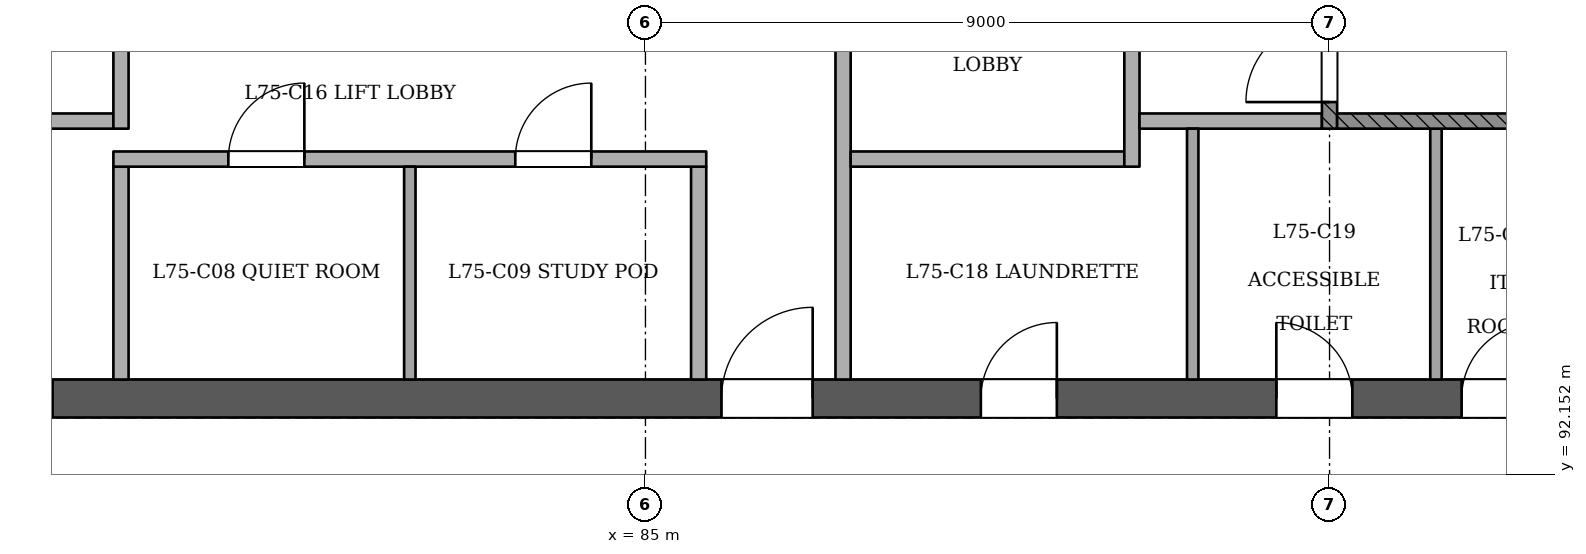
"""IFC4 building model, lengths in metres.
Left out: names, types, materials, properties, quantities, classifications, styles, units other than length and angle.
Written with IfcOpenShell. Run it as: python <this file> out.ifc"""

import sys

from ifc_helpers import new_model, si_unit, direction, frame, frame_2d, origin, place, context, subcontext, project, spatial, rectangle, extrude, element, fill, save


model = new_model("IFC4")
c1 = context("Model", 3, precision=1e-05, world=origin(), true_north=direction((0.0, 1.0)))
c2 = subcontext(c1, "Body", "Model", "MODEL_VIEW")
j1 = project(units=[si_unit("LENGTHUNIT", "METRE"), si_unit("PLANEANGLEUNIT", "RADIAN")], contexts=[c1])
p1 = place(None, origin())
s1 = spatial("IfcSite", under=j1, at=p1, CompositionType="ELEMENT")
p2 = place(p1, origin())
s2 = spatial("IfcBuilding", under=s1, at=p2, CompositionType="ELEMENT")
p3 = place(p2, frame((0.0, 0.0, 291.4)))
s3 = spatial("IfcBuildingStorey", under=s2, at=p3, CompositionType="ELEMENT", Elevation=291.4)
p4 = place(p3, frame((72.75, 93.15, 0.0), z_axis=(0.0, 0.0, 1.0), x_axis=(1.0, 0.0, 0.0)))
e1 = element("IfcWall", 1, at=p4, inside=s3, PredefinedType="SHEAR", context=c2, shape_type="SweptSolid", body=[
    extrude(rectangle(XDim=24.75, YDim=0.5, at=frame_2d((12.375, 0.0))), origin(), (0.0, 0.0, 1.0), 3.6),
])
p5 = place(p4, frame((1.05, 0.0, 0.0)))
e2 = element("IfcOpeningElement", 2, at=p5, cuts=e1, PredefinedType="OPENING", context=c2, shape_type="SweptSolid", body=[
    extrude(rectangle(XDim=1.2, YDim=2.1, at=frame_2d((0.6, 1.05))), frame((0.0, 0.26, 0.0), z_axis=(0.0, -1.0, 0.0), x_axis=(1.0, 0.0, 0.0)), (0.0, 0.0, 1.0), 0.521),
])
p6 = place(p4, frame((3.25, 0.0, 0.0)))
e3 = element("IfcOpeningElement", 3, at=p6, cuts=e1, PredefinedType="OPENING", context=c2, shape_type="SweptSolid", body=[
    extrude(rectangle(XDim=1.2, YDim=2.1, at=frame_2d((0.6, 1.05))), frame((0.0, 0.26, 0.0), z_axis=(0.0, -1.0, 0.0), x_axis=(1.0, 0.0, 0.0)), (0.0, 0.0, 1.0), 0.521),
])
p7 = place(p4, frame((13.25, 0.0, 0.0)))
e4 = element("IfcOpeningElement", 4, at=p7, cuts=e1, PredefinedType="OPENING", context=c2, shape_type="SweptSolid", body=[
    extrude(rectangle(XDim=1.2, YDim=2.1, at=frame_2d((0.6, 1.05))), frame((0.0, 0.26, 0.0), z_axis=(0.0, -1.0, 0.0), x_axis=(1.0, 0.0, 0.0)), (0.0, 0.0, 1.0), 0.521),
])
p8 = place(p4, frame((16.663, 0.0, 0.0)))
e5 = element("IfcOpeningElement", 5, at=p8, cuts=e1, PredefinedType="OPENING", context=c2, shape_type="SweptSolid", body=[
    extrude(rectangle(XDim=1.0, YDim=2.1, at=frame_2d((0.5, 1.05))), frame((0.0, 0.26, 0.0), z_axis=(0.0, -1.0, 0.0), x_axis=(1.0, 0.0, 0.0)), (0.0, 0.0, 1.0), 0.521),
])
p9 = place(p4, frame((20.55, 0.0, 0.0)))
e6 = element("IfcOpeningElement", 6, at=p9, cuts=e1, PredefinedType="OPENING", context=c2, shape_type="SweptSolid", body=[
    extrude(rectangle(XDim=1.0, YDim=2.1, at=frame_2d((0.5, 1.05))), frame((0.0, 0.26, 0.0), z_axis=(0.0, -1.0, 0.0), x_axis=(1.0, 0.0, 0.0)), (0.0, 0.0, 1.0), 0.521),
])
p10 = place(p4, frame((22.988, 0.0, 0.0)))
e7 = element("IfcOpeningElement", 7, at=p10, cuts=e1, PredefinedType="OPENING", context=c2, shape_type="SweptSolid", body=[
    extrude(rectangle(XDim=1.0, YDim=2.1, at=frame_2d((0.5, 1.05))), frame((0.0, 0.26, 0.0), z_axis=(0.0, -1.0, 0.0), x_axis=(1.0, 0.0, 0.0)), (0.0, 0.0, 1.0), 0.521),
])
p11 = place(p3, frame((78.1, 93.4, 0.0), z_axis=(0.0, 0.0, 1.0), x_axis=(0.0, 1.0, 0.0)))
e8 = element("IfcWall", 8, at=p11, inside=s3, PredefinedType="PARTITIONING", context=c2, shape_type="SweptSolid", body=[
    extrude(rectangle(XDim=2.8, YDim=0.2, at=frame_2d((1.4, 0.0))), origin(), (0.0, 0.0, 1.0), 3.2),
])
p12 = place(p3, frame((81.9, 93.4, 0.0), z_axis=(0.0, 0.0, 1.0), x_axis=(0.0, 1.0, 0.0)))
e9 = element("IfcWall", 9, at=p12, inside=s3, PredefinedType="PARTITIONING", context=c2, shape_type="SweptSolid", body=[
    extrude(rectangle(XDim=2.8, YDim=0.15, at=frame_2d((1.4, 0.0))), origin(), (0.0, 0.0, 1.0), 3.2),
])
p13 = place(p3, frame((85.7, 93.4, 0.0), z_axis=(0.0, 0.0, 1.0), x_axis=(0.0, 1.0, 0.0)))
e10 = element("IfcWall", 10, at=p13, inside=s3, PredefinedType="PARTITIONING", context=c2, shape_type="SweptSolid", body=[
    extrude(rectangle(XDim=2.8, YDim=0.2, at=frame_2d((1.4, 0.0))), origin(), (0.0, 0.0, 1.0), 3.2),
])
p14 = place(p3, frame((87.6, 93.4, 0.0), z_axis=(0.0, 0.0, 1.0), x_axis=(0.0, 1.0, 0.0)))
e11 = element("IfcWall", 11, at=p14, inside=s3, PredefinedType="PARTITIONING", context=c2, shape_type="SweptSolid", body=[
    extrude(rectangle(XDim=7.0, YDim=0.2, at=frame_2d((3.5, 0.0))), origin(), (0.0, 0.0, 1.0), 3.2),
])
p15 = place(p14, frame((4.45, 0.0, 0.0)))
e12 = element("IfcOpeningElement", 12, at=p15, cuts=e11, PredefinedType="OPENING", context=c2, shape_type="SweptSolid", body=[
    extrude(rectangle(XDim=1.1, YDim=2.1, at=frame_2d((0.55, 1.05))), frame((0.0, 0.11, 0.0), z_axis=(0.0, -1.0, 0.0), x_axis=(1.0, 0.0, 0.0)), (0.0, 0.0, 1.0), 0.221),
])
for number, where, z_axis, x_axis in (
    (13, (92.2, 93.4, 0.0), (0.0, 0.0, 1.0), (0.0, 1.0, 0.0)),
    (14, (95.4, 93.4, 0.0), (0.0, 0.0, 1.0), (0.0, 1.0, 0.0)),
):
    element("IfcWall", number, at=place(p3, frame(where, z_axis=z_axis, x_axis=x_axis)), inside=s3, PredefinedType="PARTITIONING", context=c2, shape_type="SweptSolid", body=[
        extrude(rectangle(XDim=3.3, YDim=0.15, at=frame_2d((1.65, 0.0))), origin(), (0.0, 0.0, 1.0), 3.2),
    ])
p16 = place(p3, frame((78.0, 96.3, 0.0), z_axis=(0.0, 0.0, 1.0), x_axis=(1.0, 0.0, 0.0)))
e15 = element("IfcWall", 15, at=p16, inside=s3, PredefinedType="PARTITIONING", context=c2, shape_type="SweptSolid", body=[
    extrude(rectangle(XDim=7.8, YDim=0.2, at=frame_2d((3.9, 0.0))), origin(), (0.0, 0.0, 1.0), 3.2),
])
p17 = place(p16, frame((1.512, 0.0, 0.0)))
e16 = element("IfcOpeningElement", 16, at=p17, cuts=e15, PredefinedType="OPENING", context=c2, shape_type="SweptSolid", body=[
    extrude(rectangle(XDim=1.0, YDim=2.1, at=frame_2d((0.5, 1.05))), frame((0.0, 0.11, 0.0), z_axis=(0.0, -1.0, 0.0), x_axis=(1.0, 0.0, 0.0)), (0.0, 0.0, 1.0), 0.221),
])
p18 = place(p16, frame((5.288, 0.0, 0.0)))
e17 = element("IfcOpeningElement", 17, at=p18, cuts=e15, PredefinedType="OPENING", context=c2, shape_type="SweptSolid", body=[
    extrude(rectangle(XDim=1.0, YDim=2.1, at=frame_2d((0.5, 1.05))), frame((0.0, 0.11, 0.0), z_axis=(0.0, -1.0, 0.0), x_axis=(1.0, 0.0, 0.0)), (0.0, 0.0, 1.0), 0.221),
])
p19 = place(p3, frame((87.7, 96.3, 0.0), z_axis=(0.0, 0.0, 1.0), x_axis=(1.0, 0.0, 0.0)))
e18 = element("IfcWall", 18, at=p19, inside=s3, PredefinedType="PARTITIONING", context=c2, shape_type="SweptSolid", body=[
    extrude(rectangle(XDim=3.6, YDim=0.2, at=frame_2d((1.8, 0.0))), origin(), (0.0, 0.0, 1.0), 3.2),
])
p20 = place(p3, frame((91.4, 96.2, 0.0), z_axis=(0.0, 0.0, 1.0), x_axis=(0.0, 1.0, 0.0)))
e19 = element("IfcWall", 19, at=p20, inside=s3, PredefinedType="PARTITIONING", context=c2, shape_type="SweptSolid", body=[
    extrude(rectangle(XDim=4.2, YDim=0.2, at=frame_2d((2.1, 0.0))), origin(), (0.0, 0.0, 1.0), 3.2),
])
p21 = place(p20, frame((2.45, 0.0, 0.0)))
e20 = element("IfcOpeningElement", 20, at=p21, cuts=e19, PredefinedType="OPENING", context=c2, shape_type="SweptSolid", body=[
    extrude(rectangle(XDim=1.1, YDim=2.1, at=frame_2d((0.55, 1.05))), frame((0.0, 0.11, 0.0), z_axis=(0.0, -1.0, 0.0), x_axis=(1.0, 0.0, 0.0)), (0.0, 0.0, 1.0), 0.221),
])
p22 = place(p3, frame((76.1, 96.8, 0.0), z_axis=(0.0, 0.0, 1.0), x_axis=(1.0, 0.0, 0.0)))
e21 = element("IfcWall", 21, at=p22, inside=s3, PredefinedType="PARTITIONING", context=c2, shape_type="SweptSolid", body=[
    extrude(rectangle(XDim=1.9, YDim=0.2, at=frame_2d((0.95, 0.0))), origin(), (0.0, 0.0, 1.0), 3.2),
])
p23 = place(p3, frame((78.1, 96.7, 0.0), z_axis=(0.0, 0.0, 1.0), x_axis=(0.0, 1.0, 0.0)))
e22 = element("IfcWall", 22, at=p23, inside=s3, PredefinedType="PARTITIONING", context=c2, shape_type="SweptSolid", body=[
    extrude(rectangle(XDim=3.7, YDim=0.2, at=frame_2d((1.85, 0.0))), origin(), (0.0, 0.0, 1.0), 3.2),
])
p24 = place(p23, frame((1.95, 0.0, 0.0)))
e23 = element("IfcOpeningElement", 23, at=p24, cuts=e22, PredefinedType="OPENING", context=c2, shape_type="SweptSolid", body=[
    extrude(rectangle(XDim=1.1, YDim=2.1, at=frame_2d((0.55, 1.05))), frame((0.0, 0.11, 0.0), z_axis=(0.0, -1.0, 0.0), x_axis=(1.0, 0.0, 0.0)), (0.0, 0.0, 1.0), 0.221),
])
p25 = place(p3, frame((91.5, 96.8, 0.0), z_axis=(0.0, 0.0, 1.0), x_axis=(1.0, 0.0, 0.0)))
e24 = element("IfcWall", 24, at=p25, inside=s3, PredefinedType="PARTITIONING", context=c2, shape_type="SweptSolid", body=[
    extrude(rectangle(XDim=2.4, YDim=0.2, at=frame_2d((1.2, 0.0))), origin(), (0.0, 0.0, 1.0), 3.2),
])
p26 = place(p3, frame((94.0, 96.7, 0.0), z_axis=(0.0, 0.0, 1.0), x_axis=(0.0, 1.0, 0.0)))
e25 = element("IfcWall", 25, at=p26, inside=s3, PredefinedType="SOLIDWALL", context=c2, shape_type="SweptSolid", body=[
    extrude(rectangle(XDim=3.7, YDim=0.2, at=frame_2d((1.85, 0.0))), origin(), (0.0, 0.0, 1.0), 3.2),
])
p27 = place(p26, frame((0.35, 0.0, 0.0)))
e26 = element("IfcOpeningElement", 26, at=p27, cuts=e25, PredefinedType="OPENING", context=c2, shape_type="SweptSolid", body=[
    extrude(rectangle(XDim=1.1, YDim=2.1, at=frame_2d((0.55, 1.05))), frame((0.0, 0.11, 0.0), z_axis=(0.0, -1.0, 0.0), x_axis=(1.0, 0.0, 0.0)), (0.0, 0.0, 1.0), 0.221),
])
p28 = place(p3, frame((94.1, 96.8, 0.0), z_axis=(0.0, 0.0, 1.0), x_axis=(1.0, 0.0, 0.0)))
e27 = element("IfcWall", 27, at=p28, inside=s3, PredefinedType="SOLIDWALL", context=c2, shape_type="SweptSolid", body=[
    extrude(rectangle(XDim=2.9, YDim=0.2, at=frame_2d((1.45, 0.0))), origin(), (0.0, 0.0, 1.0), 3.2),
])
p29 = place(p27, origin())
e28 = element("IfcDoor", 28, at=p29, inside=s3, OperationType="SINGLE_SWING_LEFT", PredefinedType="NOTDEFINED", context=c2, shape_type="SweptSolid", body=[
    extrude(rectangle(XDim=1.1, YDim=2.1, at=frame_2d((0.55, 1.05))), frame((0.0, 0.025, 0.0), z_axis=(0.0, -1.0, 0.0), x_axis=(1.0, 0.0, 0.0)), (0.0, 0.0, 1.0), 0.05),
])
fill(e26, e28)
p30 = place(p6, origin())
e29 = element("IfcDoor", 29, at=p30, inside=s3, OperationType="SINGLE_SWING_LEFT", PredefinedType="NOTDEFINED", context=c2, shape_type="SweptSolid", body=[
    extrude(rectangle(XDim=1.2, YDim=2.1, at=frame_2d((0.6, 1.05))), frame((0.0, 0.025, 0.0), z_axis=(0.0, -1.0, 0.0), x_axis=(1.0, 0.0, 0.0)), (0.0, 0.0, 1.0), 0.05),
])
fill(e3, e29)
p31 = place(p7, origin())
e30 = element("IfcDoor", 30, at=p31, inside=s3, OperationType="SINGLE_SWING_RIGHT", PredefinedType="NOTDEFINED", context=c2, shape_type="SweptSolid", body=[
    extrude(rectangle(XDim=1.2, YDim=2.1, at=frame_2d((0.6, 1.05))), frame((0.0, 0.025, 0.0), z_axis=(0.0, -1.0, 0.0), x_axis=(1.0, 0.0, 0.0)), (0.0, 0.0, 1.0), 0.05),
])
fill(e4, e30)
p32 = place(p8, origin())
e31 = element("IfcDoor", 31, at=p32, inside=s3, OperationType="SINGLE_SWING_RIGHT", PredefinedType="NOTDEFINED", context=c2, shape_type="SweptSolid", body=[
    extrude(rectangle(XDim=1.0, YDim=2.1, at=frame_2d((0.5, 1.05))), frame((0.0, 0.025, 0.0), z_axis=(0.0, -1.0, 0.0), x_axis=(1.0, 0.0, 0.0)), (0.0, 0.0, 1.0), 0.05),
])
fill(e5, e31)
p33 = place(p9, origin())
e32 = element("IfcDoor", 32, at=p33, inside=s3, OperationType="SINGLE_SWING_LEFT", PredefinedType="NOTDEFINED", context=c2, shape_type="SweptSolid", body=[
    extrude(rectangle(XDim=1.0, YDim=2.1, at=frame_2d((0.5, 1.05))), frame((0.0, 0.025, 0.0), z_axis=(0.0, -1.0, 0.0), x_axis=(1.0, 0.0, 0.0)), (0.0, 0.0, 1.0), 0.05),
])
fill(e6, e32)
p34 = place(p10, origin())
e33 = element("IfcDoor", 33, at=p34, inside=s3, OperationType="SINGLE_SWING_RIGHT", PredefinedType="NOTDEFINED", context=c2, shape_type="SweptSolid", body=[
    extrude(rectangle(XDim=1.0, YDim=2.1, at=frame_2d((0.5, 1.05))), frame((0.0, 0.025, 0.0), z_axis=(0.0, -1.0, 0.0), x_axis=(1.0, 0.0, 0.0)), (0.0, 0.0, 1.0), 0.05),
])
fill(e7, e33)
p35 = place(p17, origin())
e34 = element("IfcDoor", 34, at=p35, inside=s3, OperationType="SINGLE_SWING_RIGHT", PredefinedType="NOTDEFINED", context=c2, shape_type="SweptSolid", body=[
    extrude(rectangle(XDim=1.0, YDim=2.1, at=frame_2d((0.5, 1.05))), frame((0.0, 0.025, 0.0), z_axis=(0.0, -1.0, 0.0), x_axis=(1.0, 0.0, 0.0)), (0.0, 0.0, 1.0), 0.05),
])
fill(e16, e34)
p36 = place(p18, origin())
e35 = element("IfcDoor", 35, at=p36, inside=s3, OperationType="SINGLE_SWING_RIGHT", PredefinedType="NOTDEFINED", context=c2, shape_type="SweptSolid", body=[
    extrude(rectangle(XDim=1.0, YDim=2.1, at=frame_2d((0.5, 1.05))), frame((0.0, 0.025, 0.0), z_axis=(0.0, -1.0, 0.0), x_axis=(1.0, 0.0, 0.0)), (0.0, 0.0, 1.0), 0.05),
])
fill(e17, e35)
save(model, sys.argv[1])
